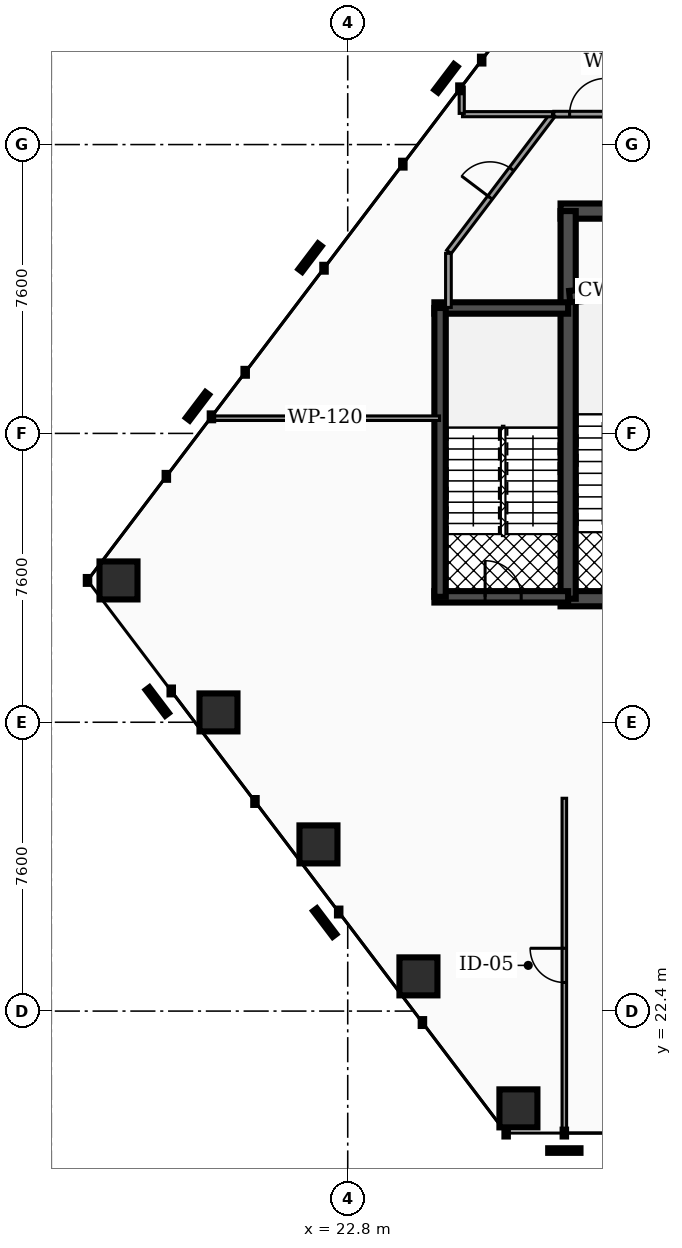
"""IFC4 building model, lengths in metres.
Left out: names, types, materials, properties, quantities, classifications, styles, units other than length and angle.
Written with IfcOpenShell. Run it as: python <this file> out.ifc"""

import sys

from ifc_helpers import new_model, si_unit, direction, frame, frame_2d, origin, origin_2d, place, context, subcontext, project, spatial, rectangle, hollow_rectangle, extrude, element, fill, save


model = new_model("IFC4")
c1 = context("Model", 3, precision=1e-05, world=origin(), true_north=direction((0.0, 1.0)))
c2 = subcontext(c1, "Body", "Model", "MODEL_VIEW")
j1 = project(units=[si_unit("LENGTHUNIT", "METRE"), si_unit("PLANEANGLEUNIT", "RADIAN")], contexts=[c1])
p1 = place(None, origin())
s1 = spatial("IfcSite", under=j1, at=p1, CompositionType="ELEMENT")
p2 = place(p1, origin())
s2 = spatial("IfcBuilding", under=s1, at=p2, CompositionType="ELEMENT")
p3 = place(p2, frame((0.0, 0.0, 31.62)))
s3 = spatial("IfcBuildingStorey", under=s2, at=p3, CompositionType="ELEMENT", Elevation=31.62)
p4 = place(p3, frame((28.4, 43.45, 0.0), z_axis=(0.0, 0.0, 1.0), x_axis=(1.0, 0.0, 0.0)))
e1 = element("IfcWall", 1, at=p4, inside=s3, PredefinedType="SHEAR", context=c2, shape_type="SweptSolid", body=[
    extrude(rectangle(XDim=20.06, YDim=0.4, at=frame_2d((10.03, 0.0))), origin(), (0.0, 0.0, 1.0), 3.82),
])
p5 = place(p3, frame((28.4, 33.25, 0.0), z_axis=(0.0, 0.0, 1.0), x_axis=(1.0, 0.0, 0.0)))
e2 = element("IfcWall", 2, at=p5, inside=s3, PredefinedType="SHEAR", context=c2, shape_type="SweptSolid", body=[
    extrude(rectangle(XDim=20.06, YDim=0.4, at=frame_2d((10.03, 0.0))), origin(), (0.0, 0.0, 1.0), 3.82),
])
p6 = place(p5, frame((4.03, 0.0, 0.0)))
e3 = element("IfcOpeningElement", 3, at=p6, cuts=e2, PredefinedType="OPENING", context=c2, shape_type="SweptSolid", body=[
    extrude(rectangle(XDim=1.1, YDim=2.15, at=frame_2d((0.55, 1.075))), frame((0.0, 0.21, 0.0), z_axis=(0.0, -1.0, 0.0), x_axis=(1.0, 0.0, 0.0)), (0.0, 0.0, 1.0), 0.42),
])
p7 = place(p5, frame((14.87, 0.0, 0.0)))
e4 = element("IfcOpeningElement", 4, at=p7, cuts=e2, PredefinedType="OPENING", context=c2, shape_type="SweptSolid", body=[
    extrude(rectangle(XDim=1.1, YDim=2.15, at=frame_2d((0.55, 1.075))), frame((0.0, 0.21, 0.0), z_axis=(0.0, -1.0, 0.0), x_axis=(1.0, 0.0, 0.0)), (0.0, 0.0, 1.0), 0.42),
])
p8 = place(p5, frame((1.31, 0.0, 0.0)))
e5 = element("IfcOpeningElement", 5, at=p8, cuts=e2, PredefinedType="OPENING", context=c2, shape_type="SweptSolid", body=[
    extrude(rectangle(XDim=1.1, YDim=2.2, at=frame_2d((0.55, 1.1))), frame((0.0, 0.21, 0.0), z_axis=(0.0, -1.0, 0.0), x_axis=(1.0, 0.0, 0.0)), (0.0, 0.0, 1.0), 0.42),
])
p9 = place(p5, frame((9.44, 0.0, 0.0)))
e6 = element("IfcOpeningElement", 6, at=p9, cuts=e2, PredefinedType="OPENING", context=c2, shape_type="SweptSolid", body=[
    extrude(rectangle(XDim=1.12, YDim=2.05, at=frame_2d((0.56, 1.025))), frame((0.0, 0.21, 0.0), z_axis=(0.0, -1.0, 0.0), x_axis=(1.0, 0.0, 0.0)), (0.0, 0.0, 1.0), 0.42),
])
p10 = place(p5, frame((17.65, 0.0, 0.0)))
e7 = element("IfcOpeningElement", 7, at=p10, cuts=e2, PredefinedType="OPENING", context=c2, shape_type="SweptSolid", body=[
    extrude(rectangle(XDim=1.1, YDim=2.2, at=frame_2d((0.55, 1.1))), frame((0.0, 0.21, 0.0), z_axis=(0.0, -1.0, 0.0), x_axis=(1.0, 0.0, 0.0)), (0.0, 0.0, 1.0), 0.42),
])
p11 = place(p3, frame((28.6, 33.25, 0.0), z_axis=(0.0, 0.0, 1.0), x_axis=(0.0, 1.0, 0.0)))
e8 = element("IfcWall", 8, at=p11, inside=s3, PredefinedType="SHEAR", context=c2, shape_type="SweptSolid", body=[
    extrude(rectangle(XDim=10.2, YDim=0.4, at=frame_2d((5.1, 0.0))), origin(), (0.0, 0.0, 1.0), 3.82),
])
p12 = place(p3, frame((28.64, 41.2, 0.0), z_axis=(0.0, 0.0, 1.0), x_axis=(0.995687118776, 0.092774789157, 0.0)))
e9 = element("IfcWall", 9, at=p12, inside=s3, PredefinedType="SHEAR", context=c2, shape_type="SweptSolid", body=[
    extrude(rectangle(XDim=3.234, YDim=0.3, at=frame_2d((1.617, 0.0))), origin(), (0.0, 0.0, 1.0), 3.82),
])
p13 = place(p3, frame((25.08, 40.9, 0.0), z_axis=(0.0, 0.0, 1.0), x_axis=(1.0, 0.0, 0.0)))
e10 = element("IfcWall", 10, at=p13, inside=s3, PredefinedType="SHEAR", context=c2, shape_type="SweptSolid", body=[
    extrude(rectangle(XDim=3.52, YDim=0.3, at=frame_2d((1.76, 0.0))), origin(), (0.0, 0.0, 1.0), 3.82),
])
p14 = place(p3, frame((25.08, 33.3, 0.0), z_axis=(0.0, 0.0, 1.0), x_axis=(1.0, 0.0, 0.0)))
e11 = element("IfcWall", 11, at=p14, inside=s3, PredefinedType="SHEAR", context=c2, shape_type="SweptSolid", body=[
    extrude(rectangle(XDim=3.52, YDim=0.3, at=frame_2d((1.76, 0.0))), origin(), (0.0, 0.0, 1.0), 3.82),
])
p15 = place(p14, frame((1.335, 0.0, 0.0)))
e12 = element("IfcOpeningElement", 12, at=p15, cuts=e11, PredefinedType="OPENING", context=c2, shape_type="SweptSolid", body=[
    extrude(rectangle(XDim=0.95, YDim=2.2, at=frame_2d((0.475, 1.1))), frame((0.0, 0.16, 0.0), z_axis=(0.0, -1.0, 0.0), x_axis=(1.0, 0.0, 0.0)), (0.0, 0.0, 1.0), 0.32),
])
p16 = place(p3, frame((25.23, 33.3, 0.0), z_axis=(0.0, 0.0, 1.0), x_axis=(0.0, 1.0, 0.0)))
e13 = element("IfcWall", 13, at=p16, inside=s3, PredefinedType="SHEAR", context=c2, shape_type="SweptSolid", body=[
    extrude(rectangle(XDim=7.6, YDim=0.3, at=frame_2d((3.8, 0.0))), origin(), (0.0, 0.0, 1.0), 3.82),
])
for number, where, z_axis, x_axis in (
    (14, (16.768, 33.731, 0.0), (0.0, 0.0, 1.0), (1.0, 0.0, 0.0)),
    (15, (19.399, 30.259, 0.0), (0.0, 0.0, 1.0), (1.0, 0.0, 0.0)),
    (16, (22.03, 26.786, 0.0), (0.0, 0.0, 1.0), (1.0, 0.0, 0.0)),
    (17, (24.661, 23.313, 0.0), (0.0, 0.0, 1.0), (1.0, 0.0, 0.0)),
    (18, (27.292, 19.84, 0.0), (0.0, 0.0, 1.0), (1.0, 0.0, 0.0)),
):
    element("IfcColumn", number, at=place(p3, frame(where, z_axis=z_axis, x_axis=x_axis)), inside=s3, PredefinedType="COLUMN", context=c2, shape_type="SweptSolid", body=[
        extrude(hollow_rectangle(XDim=1.0, YDim=1.0, WallThickness=0.05, at=origin_2d()), origin(), (0.0, 0.0, 1.0), 3.82),
    ])
p17 = place(p3, frame((28.223, 46.0, 0.0), z_axis=(0.0, 0.0, 1.0), x_axis=(1.0, 0.0, 0.0)))
e19 = element("IfcWall", 19, at=p17, inside=s3, PredefinedType="PARTITIONING", context=c2, shape_type="SweptSolid", body=[
    extrude(rectangle(XDim=1.772, YDim=0.15, at=frame_2d((0.886, 0.0))), origin(), (0.0, 0.0, 1.0), 2.777),
])
p18 = place(p17, frame((0.416, 0.0, 0.0)))
e20 = element("IfcOpeningElement", 20, at=p18, cuts=e19, PredefinedType="OPENING", context=c2, shape_type="SweptSolid", body=[
    extrude(rectangle(XDim=0.94, YDim=2.05, at=frame_2d((0.47, 1.025))), frame((0.0, 0.085, 0.0), z_axis=(0.0, -1.0, 0.0), x_axis=(1.0, 0.0, 0.0)), (0.0, 0.0, 1.0), 0.17),
])
p19 = place(p3, frame((25.45, 40.915, 0.0), z_axis=(0.0, 0.0, 1.0), x_axis=(0.0, 1.0, 0.0)))
e21 = element("IfcWall", 21, at=p19, inside=s3, PredefinedType="PARTITIONING", context=c2, shape_type="SweptSolid", body=[
    extrude(rectangle(XDim=1.425, YDim=0.15, at=frame_2d((0.712, 0.0))), origin(), (0.0, 0.0, 1.0), 2.777),
])
p20 = place(p3, frame((25.462, 42.375, 0.0), z_axis=(0.0, 0.0, 1.0), x_axis=(0.603832768772, 0.797111025741, 0.0)))
e22 = element("IfcWall", 22, at=p20, inside=s3, PredefinedType="PARTITIONING", context=c2, shape_type="SweptSolid", body=[
    extrude(rectangle(XDim=4.527, YDim=0.15, at=frame_2d((2.264, 0.0))), origin(), (0.0, 0.0, 1.0), 2.777),
])
p21 = place(p20, frame((1.793, 0.0, 0.0)))
e23 = element("IfcOpeningElement", 23, at=p21, cuts=e22, PredefinedType="OPENING", context=c2, shape_type="SweptSolid", body=[
    extrude(rectangle(XDim=0.94, YDim=2.05, at=frame_2d((0.47, 1.025))), frame((0.0, 0.085, 0.0), z_axis=(0.0, -1.0, 0.0), x_axis=(1.0, 0.0, 0.0)), (0.0, 0.0, 1.0), 0.17),
])
p22 = place(p3, frame((25.82, 46.0, 0.0), z_axis=(0.0, 0.0, 1.0), x_axis=(1.0, 0.0, 0.0)))
e24 = element("IfcWall", 24, at=p22, inside=s3, PredefinedType="PARTITIONING", context=c2, shape_type="SweptSolid", body=[
    extrude(rectangle(XDim=2.368, YDim=0.135, at=frame_2d((1.184, 0.0))), origin(), (0.0, 0.0, 1.0), 2.777),
])
p23 = place(p3, frame((25.8, 46.02, 0.0), z_axis=(0.0, 0.0, 1.0), x_axis=(0.0, 1.0, 0.0)))
e25 = element("IfcWall", 25, at=p23, inside=s3, PredefinedType="PARTITIONING", context=c2, shape_type="SweptSolid", body=[
    extrude(rectangle(XDim=0.695, YDim=0.135, at=frame_2d((0.347, 0.0))), origin(), (0.0, 0.0, 1.0), 2.777),
])
p24 = place(p3, frame((28.5, 19.205, 0.0), z_axis=(0.0, 0.0, 1.0), x_axis=(0.0, 1.0, 0.0)))
e26 = element("IfcWall", 26, at=p24, inside=s3, PredefinedType="PARTITIONING", context=c2, shape_type="SweptSolid", body=[
    extrude(rectangle(XDim=8.795, YDim=0.12, at=frame_2d((4.397, 0.0))), origin(), (0.0, 0.0, 1.0), 2.777),
])
p25 = place(p24, frame((3.947, 0.0, 0.0)))
e27 = element("IfcOpeningElement", 27, at=p25, cuts=e26, PredefinedType="OPENING", context=c2, shape_type="SweptSolid", body=[
    extrude(rectangle(XDim=0.9, YDim=2.05, at=frame_2d((0.45, 1.025))), frame((0.0, 0.07, 0.0), z_axis=(0.0, -1.0, 0.0), x_axis=(1.0, 0.0, 0.0)), (0.0, 0.0, 1.0), 0.14),
])
p26 = place(p3, frame((19.201, 38.0, 0.0), z_axis=(0.0, 0.0, 1.0), x_axis=(1.0, 0.0, 0.0)))
e28 = element("IfcWall", 28, at=p26, inside=s3, PredefinedType="PARTITIONING", context=c2, shape_type="SweptSolid", body=[
    extrude(rectangle(XDim=6.014, YDim=0.12, at=frame_2d((3.007, 0.0))), origin(), (0.0, 0.0, 1.0), 2.777),
])
p27 = place(p15, origin())
e29 = element("IfcDoor", 29, at=p27, inside=s3, OperationType="SINGLE_SWING_LEFT", PredefinedType="DOOR", context=c2, shape_type="SweptSolid", body=[
    extrude(rectangle(XDim=0.95, YDim=2.2, at=frame_2d((0.475, 1.1))), frame((0.0, 0.025, 0.0), z_axis=(0.0, -1.0, 0.0), x_axis=(1.0, 0.0, 0.0)), (0.0, 0.0, 1.0), 0.05),
])
fill(e12, e29)
p28 = place(p18, origin())
e30 = element("IfcDoor", 30, at=p28, inside=s3, OperationType="SINGLE_SWING_RIGHT", PredefinedType="DOOR", context=c2, shape_type="SweptSolid", body=[
    extrude(rectangle(XDim=0.94, YDim=2.05, at=frame_2d((0.47, 1.025))), frame((0.0, 0.025, 0.0), z_axis=(0.0, -1.0, 0.0), x_axis=(1.0, 0.0, 0.0)), (0.0, 0.0, 1.0), 0.05),
])
fill(e20, e30)
p29 = place(p21, origin())
e31 = element("IfcDoor", 31, at=p29, inside=s3, OperationType="SINGLE_SWING_LEFT", PredefinedType="DOOR", context=c2, shape_type="SweptSolid", body=[
    extrude(rectangle(XDim=0.94, YDim=2.05, at=frame_2d((0.47, 1.025))), frame((0.0, 0.025, 0.0), z_axis=(0.0, -1.0, 0.0), x_axis=(1.0, 0.0, 0.0)), (0.0, 0.0, 1.0), 0.05),
])
fill(e23, e31)
p30 = place(p25, origin())
e32 = element("IfcDoor", 32, at=p30, inside=s3, OperationType="SINGLE_SWING_RIGHT", PredefinedType="DOOR", context=c2, shape_type="SweptSolid", body=[
    extrude(rectangle(XDim=0.9, YDim=2.05, at=frame_2d((0.45, 1.025))), frame((0.0, 0.025, 0.0), z_axis=(0.0, -1.0, 0.0), x_axis=(1.0, 0.0, 0.0)), (0.0, 0.0, 1.0), 0.05),
])
fill(e27, e32)
save(model, sys.argv[1])
